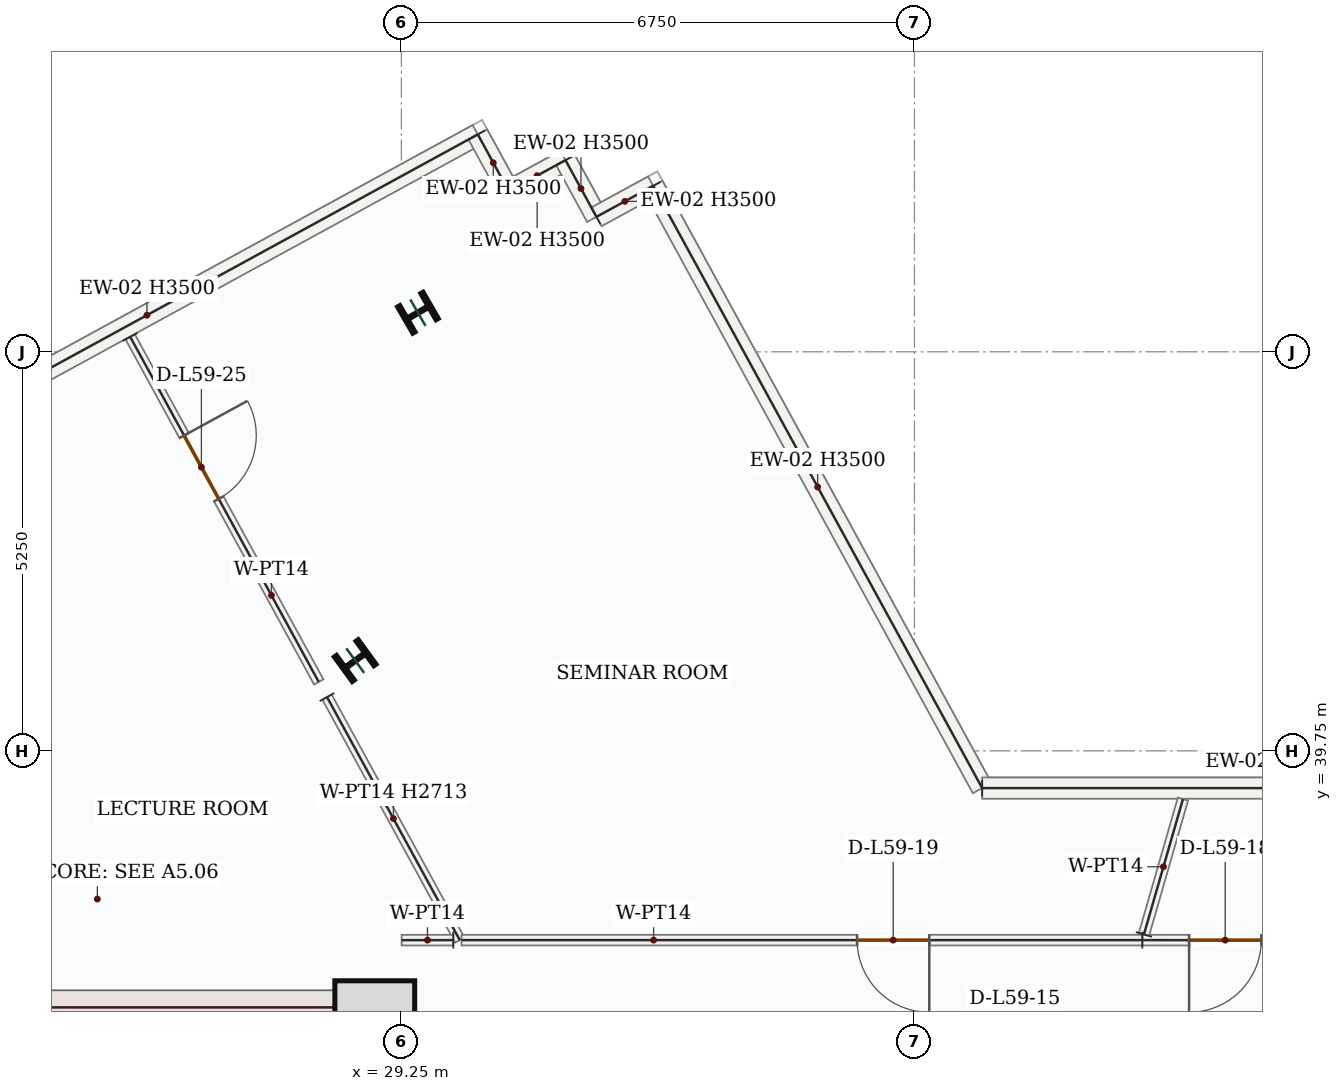
"""IFC4 building model, lengths in metres.
Left out: names, types, materials, properties, quantities, classifications, styles, units other than length and angle.
Written with IfcOpenShell. Run it as: python <this file> out.ifc"""

import sys

from ifc_helpers import new_model, si_unit, direction, frame, frame_2d, origin, origin_2d, place, context, subcontext, project, spatial, rectangle, i_section, extrude, source, transform, mapped, element, fill, save


model = new_model("IFC4")
c1 = context("Model", 3, precision=1e-05, world=origin(), true_north=direction((0.0, 1.0)))
c2 = subcontext(c1, "Body", "Model", "MODEL_VIEW")
j1 = project(units=[si_unit("LENGTHUNIT", "METRE"), si_unit("PLANEANGLEUNIT", "RADIAN")], contexts=[c1])
p1 = place(None, origin())
s1 = spatial("IfcSite", under=j1, at=p1, CompositionType="ELEMENT")
p2 = place(p1, origin())
s2 = spatial("IfcBuilding", under=s1, at=p2, CompositionType="ELEMENT")
p3 = place(p2, frame((0.0, 0.0, 250.35)))
s3 = spatial("IfcBuildingStorey", under=s2, at=p3, CompositionType="ELEMENT", Elevation=250.35)
p4 = place(p3, frame((29.025, 28.05, 0.0), z_axis=(0.0, 0.0, 1.0), x_axis=(0.0, 1.0, 0.0)))
e1 = element("IfcWall", 1, at=p4, inside=s3, PredefinedType="SHEAR", context=c2, shape_type="SweptSolid", body=[
    extrude(rectangle(XDim=8.55, YDim=0.45, at=frame_2d((4.275, 0.0))), origin(), (0.0, 0.0, 1.0), 3.5),
])
p5 = place(p4, frame((1.5, 0.0, 0.0)))
e2 = element("IfcOpeningElement", 2, at=p5, cuts=e1, PredefinedType="OPENING", context=c2, shape_type="SweptSolid", body=[
    extrude(rectangle(XDim=1.1, YDim=2.2, at=frame_2d((0.55, 1.1))), frame((0.0, 0.235, 0.0), z_axis=(0.0, -1.0, 0.0), x_axis=(1.0, 0.0, 0.0)), (0.0, 0.0, 1.0), 0.47),
])
m1 = source(origin(), c2, "Body", "SweptSolid", [
    extrude(rectangle(XDim=7.1, YDim=0.45, at=frame_2d((3.55, 0.0))), origin(), (0.0, 0.0, 1.0), 3.5),
])
p6 = place(p3, frame((21.7, 36.375, 0.0), z_axis=(0.0, 0.0, 1.0), x_axis=(1.0, 0.0, 0.0)))
e3 = element("IfcWall", 3, at=p6, inside=s3, PredefinedType="SHEAR", context=c2, shape_type="MappedRepresentation", body=[
    mapped(m1, transform((0.0, 0.0, 0.0), x_axis=(1.0, 0.0, 0.0), y_axis=(0.0, 1.0, 0.0), z_axis=(0.0, 0.0, 1.0), scale=1.0)),
])
m2 = source(origin(), c2, "Body", "SweptSolid", [
    extrude(rectangle(XDim=1.05, YDim=1.05, at=origin_2d()), origin(), (0.0, 0.0, 1.0), 3.75),
])
p7 = place(p3, frame((28.9, 36.2, 0.0), z_axis=(0.0, 0.0, 1.0), x_axis=(1.0, 0.0, 0.0)))
e4 = element("IfcColumn", 4, at=p7, inside=s3, PredefinedType="COLUMN", context=c2, shape_type="MappedRepresentation", body=[
    mapped(m2, transform((0.0, 0.0, 0.0), x_axis=(1.0, 0.0, 0.0), y_axis=(0.0, 1.0, 0.0), z_axis=(0.0, 0.0, 1.0), scale=1.0)),
])
m3 = source(origin(), c2, "Body", "SweptSolid", [
    extrude(i_section(OverallWidth=0.399, OverallDepth=0.386, WebThickness=0.021, FlangeThickness=0.033, FilletRadius=0.018, at=origin_2d()), origin(), (0.0, 0.0, 1.0), 3.75),
])
for number, where, z_axis, x_axis in (
    (5, (28.643, 40.937, 0.0), (0.0, 0.0, 1.0), (-0.588, 0.809, 0.0)),
    (6, (29.468, 45.514, 0.0), (0.0, 0.0, 1.0), (-0.5, 0.866, 0.0)),
):
    element("IfcColumn", number, at=place(p3, frame(where, z_axis=z_axis, x_axis=x_axis)), inside=s3, PredefinedType="COLUMN", context=c2, shape_type="MappedRepresentation", body=[
        mapped(m3, transform((0.0, 0.0, 0.0), x_axis=(1.0, 0.0, 0.0), y_axis=(0.0, 1.0, 0.0), z_axis=(0.0, 0.0, 1.0), scale=1.0)),
    ])
m4 = source(origin(), c2, "Body", "SweptSolid", [
    extrude(rectangle(XDim=9.92, YDim=0.28, at=frame_2d((4.96, 0.0))), origin(), (0.0, 0.0, 1.0), 3.5),
])
p8 = place(p3, frame((21.55, 43.104, 0.0), z_axis=(0.0, 0.0, 1.0), x_axis=(0.877572768104, 0.479443465574, 0.0)))
e7 = element("IfcWall", 7, at=p8, inside=s3, PredefinedType="SOLIDWALL", context=c2, shape_type="MappedRepresentation", body=[
    mapped(m4, transform((0.0, 0.0, 0.0), x_axis=(1.0, 0.0, 0.0), y_axis=(0.0, 1.0, 0.0), z_axis=(0.0, 0.0, 1.0), scale=1.0)),
])
m5 = source(origin(), c2, "Body", "SweptSolid", [
    extrude(rectangle(XDim=0.85, YDim=0.28, at=frame_2d((0.425, 0.0))), origin(), (0.0, 0.0, 1.0), 3.5),
])
for number, where, z_axis, x_axis in (
    (8, (30.255, 47.86, 0.0), (0.0, 0.0, 1.0), (0.479, -0.878, 0.0)),
    (9, (30.663, 47.114, 0.0), (0.0, 0.0, 1.0), (0.878, 0.479, 0.0)),
):
    element("IfcWall", number, at=place(p3, frame(where, z_axis=z_axis, x_axis=x_axis)), inside=s3, PredefinedType="SOLIDWALL", context=c2, shape_type="MappedRepresentation", body=[
        mapped(m5, transform((0.0, 0.0, 0.0), x_axis=(1.0, 0.0, 0.0), y_axis=(0.0, 1.0, 0.0), z_axis=(0.0, 0.0, 1.0), scale=1.0)),
    ])
m6 = source(origin(), c2, "Body", "SweptSolid", [
    extrude(rectangle(XDim=0.85, YDim=0.28, at=frame_2d((0.425, 0.0))), origin(), (0.0, 0.0, 1.0), 3.5),
])
p9 = place(p3, frame((31.409, 47.521, 0.0), z_axis=(0.0, 0.0, 1.0), x_axis=(0.479656876283, -0.877456141943, 0.0)))
e10 = element("IfcWall", 10, at=p9, inside=s3, PredefinedType="SOLIDWALL", context=c2, shape_type="MappedRepresentation", body=[
    mapped(m6, transform((0.0, 0.0, 0.0), x_axis=(1.0, 0.0, 0.0), y_axis=(0.0, 1.0, 0.0), z_axis=(0.0, 0.0, 1.0), scale=1.0)),
])
p10 = place(p3, frame((31.816, 46.775, 0.0), z_axis=(0.0, 0.0, 1.0), x_axis=(0.877577015132, 0.479435691737, 0.0)))
e11 = element("IfcWall", 11, at=p10, inside=s3, PredefinedType="SOLIDWALL", context=c2, shape_type="MappedRepresentation", body=[
    mapped(m5, transform((0.0, 0.0, 0.0), x_axis=(1.0, 0.0, 0.0), y_axis=(0.0, 1.0, 0.0), z_axis=(0.0, 0.0, 1.0), scale=1.0)),
])
m7 = source(origin(), c2, "Body", "SweptSolid", [
    extrude(rectangle(XDim=9.028, YDim=0.28, at=frame_2d((4.514, 0.0))), origin(), (0.0, 0.0, 1.0), 3.5),
])
p11 = place(p3, frame((32.562, 47.183, 0.0), z_axis=(0.0, 0.0, 1.0), x_axis=(0.479475345647, -0.877555350344, 0.0)))
e12 = element("IfcWall", 12, at=p11, inside=s3, PredefinedType="SOLIDWALL", context=c2, shape_type="MappedRepresentation", body=[
    mapped(m7, transform((0.0, 0.0, 0.0), x_axis=(1.0, 0.0, 0.0), y_axis=(0.0, 1.0, 0.0), z_axis=(0.0, 0.0, 1.0), scale=1.0)),
])
m8 = source(origin(), c2, "Body", "SweptSolid", [
    extrude(rectangle(XDim=7.658, YDim=0.28, at=frame_2d((3.829, 0.0))), origin(), (0.0, 0.0, 1.0), 2.772),
])
p12 = place(p3, frame((36.891, 39.26, 0.0), z_axis=(0.0, 0.0, 1.0), x_axis=(1.0, 0.0, 0.0)))
e13 = element("IfcWall", 13, at=p12, inside=s3, PredefinedType="SOLIDWALL", context=c2, shape_type="MappedRepresentation", body=[
    mapped(m8, transform((0.0, 0.0, 0.0), x_axis=(1.0, 0.0, 0.0), y_axis=(0.0, 1.0, 0.0), z_axis=(0.0, 0.0, 1.0), scale=1.0)),
])
p13 = place(p3, frame((42.747, 37.259, 0.0), z_axis=(0.0, 0.0, 1.0), x_axis=(-0.99999994699, 0.000325605609, 0.0)))
e14 = element("IfcWall", 14, at=p13, inside=s3, PredefinedType="PARTITIONING", context=c2, shape_type="SweptSolid", body=[
    extrude(rectangle(XDim=3.749, YDim=0.14, at=frame_2d((1.875, 0.0))), origin(), (0.0, 0.0, 1.0), 3.5),
])
p14 = place(p13, frame((2.183, 0.0, 0.0)))
e15 = element("IfcOpeningElement", 15, at=p14, cuts=e14, PredefinedType="OPENING", context=c2, shape_type="SweptSolid", body=[
    extrude(rectangle(XDim=0.95, YDim=2.15, at=frame_2d((0.475, 1.075))), frame((0.0, 0.08, 0.0), z_axis=(0.0, -1.0, 0.0), x_axis=(1.0, 0.0, 0.0)), (0.0, 0.0, 1.0), 0.16),
])
m9 = source(origin(), c2, "Body", "SweptSolid", [
    extrude(rectangle(XDim=1.853, YDim=0.14, at=frame_2d((0.926, 0.0))), origin(), (0.0, 0.0, 1.0), 3.5),
])
p15 = place(p3, frame((39.019, 37.335, 0.0), z_axis=(0.0, 0.0, 1.0), x_axis=(0.276896245691, 0.960899822626, 0.0)))
e16 = element("IfcWall", 16, at=p15, inside=s3, PredefinedType="PARTITIONING", context=c2, shape_type="MappedRepresentation", body=[
    mapped(m9, transform((0.0, 0.0, 0.0), x_axis=(1.0, 0.0, 0.0), y_axis=(0.0, 1.0, 0.0), z_axis=(0.0, 0.0, 1.0), scale=1.0)),
])
p16 = place(p3, frame((25.683, 45.196, 0.0), z_axis=(0.0, 0.0, 1.0), x_axis=(0.479427410708, -0.877581539153, 0.0)))
e17 = element("IfcWall", 17, at=p16, inside=s3, PredefinedType="PARTITIONING", context=c2, shape_type="SweptSolid", body=[
    extrude(rectangle(XDim=5.173, YDim=0.14, at=frame_2d((2.586, 0.0))), origin(), (0.0, 0.0, 1.0), 3.5),
])
p17 = place(p16, frame((1.478, 0.0, 0.0)))
e18 = element("IfcOpeningElement", 18, at=p17, cuts=e17, PredefinedType="OPENING", context=c2, shape_type="SweptSolid", body=[
    extrude(rectangle(XDim=0.95, YDim=2.15, at=frame_2d((0.475, 1.075))), frame((0.0, 0.08, 0.0), z_axis=(0.0, -1.0, 0.0), x_axis=(1.0, 0.0, 0.0)), (0.0, 0.0, 1.0), 0.16),
])
m10 = source(origin(), c2, "Body", "SweptSolid", [
    extrude(rectangle(XDim=3.644, YDim=0.14, at=frame_2d((1.822, 0.0))), origin(), (0.0, 0.0, 1.0), 2.713),
])
p18 = place(p3, frame((28.271, 40.457, 0.0), z_axis=(0.0, 0.0, 1.0), x_axis=(0.479509272429, -0.877536812706, 0.0)))
e19 = element("IfcWall", 19, at=p18, inside=s3, PredefinedType="PARTITIONING", context=c2, shape_type="MappedRepresentation", body=[
    mapped(m10, transform((0.0, 0.0, 0.0), x_axis=(1.0, 0.0, 0.0), y_axis=(0.0, 1.0, 0.0), z_axis=(0.0, 0.0, 1.0), scale=1.0)),
])
m11 = source(origin(), c2, "Body", "SweptSolid", [
    extrude(rectangle(XDim=0.68, YDim=0.14, at=frame_2d((0.34, 0.0))), origin(), (0.0, 0.0, 1.0), 3.5),
])
p19 = place(p3, frame((29.933, 37.26, 0.0), z_axis=(0.0, 0.0, 1.0), x_axis=(-0.999999741957, -0.000718390619, 0.0)))
e20 = element("IfcWall", 20, at=p19, inside=s3, PredefinedType="PARTITIONING", context=c2, shape_type="MappedRepresentation", body=[
    mapped(m11, transform((0.0, 0.0, 0.0), x_axis=(1.0, 0.0, 0.0), y_axis=(0.0, 1.0, 0.0), z_axis=(0.0, 0.0, 1.0), scale=1.0)),
])
p20 = place(p3, frame((38.998, 37.26, 0.0), z_axis=(0.0, 0.0, 1.0), x_axis=(-1.0, 0.0, 0.0)))
e21 = element("IfcWall", 21, at=p20, inside=s3, PredefinedType="PARTITIONING", context=c2, shape_type="SweptSolid", body=[
    extrude(rectangle(XDim=8.956, YDim=0.14, at=frame_2d((4.478, 0.0))), origin(), (0.0, 0.0, 1.0), 3.5),
])
p21 = place(p20, frame((2.802, 0.0, 0.0)))
e22 = element("IfcOpeningElement", 22, at=p21, cuts=e21, PredefinedType="OPENING", context=c2, shape_type="SweptSolid", body=[
    extrude(rectangle(XDim=0.95, YDim=2.15, at=frame_2d((0.475, 1.075))), frame((0.0, 0.08, 0.0), z_axis=(0.0, -1.0, 0.0), x_axis=(1.0, 0.0, 0.0)), (0.0, 0.0, 1.0), 0.16),
])
m12 = source(origin(), c2, "Body", "SweptSolid", [
    extrude(rectangle(XDim=0.95, YDim=2.15, at=frame_2d((0.475, 1.075))), frame((0.0, 0.025, 0.0), z_axis=(0.0, -1.0, 0.0), x_axis=(1.0, 0.0, 0.0)), (0.0, 0.0, 1.0), 0.05),
])
p22 = place(p14, origin())
e23 = element("IfcDoor", 23, at=p22, inside=s3, OperationType="SINGLE_SWING_RIGHT", PredefinedType="DOOR", context=c2, shape_type="MappedRepresentation", body=[
    mapped(m12, transform((0.0, 0.0, 0.0), x_axis=(1.0, 0.0, 0.0), y_axis=(0.0, 1.0, 0.0), z_axis=(0.0, 0.0, 1.0), scale=1.0)),
])
fill(e15, e23)
p23 = place(p21, origin())
e24 = element("IfcDoor", 24, at=p23, inside=s3, OperationType="SINGLE_SWING_LEFT", PredefinedType="DOOR", context=c2, shape_type="MappedRepresentation", body=[
    mapped(m12, transform((0.0, 0.0, 0.0), x_axis=(1.0, 0.0, 0.0), y_axis=(0.0, 1.0, 0.0), z_axis=(0.0, 0.0, 1.0), scale=1.0)),
])
fill(e22, e24)
p24 = place(p17, origin())
e25 = element("IfcDoor", 25, at=p24, inside=s3, OperationType="SINGLE_SWING_LEFT", PredefinedType="DOOR", context=c2, shape_type="MappedRepresentation", body=[
    mapped(m12, transform((0.0, 0.0, 0.0), x_axis=(1.0, 0.0, 0.0), y_axis=(0.0, 1.0, 0.0), z_axis=(0.0, 0.0, 1.0), scale=1.0)),
])
fill(e18, e25)
save(model, sys.argv[1])
